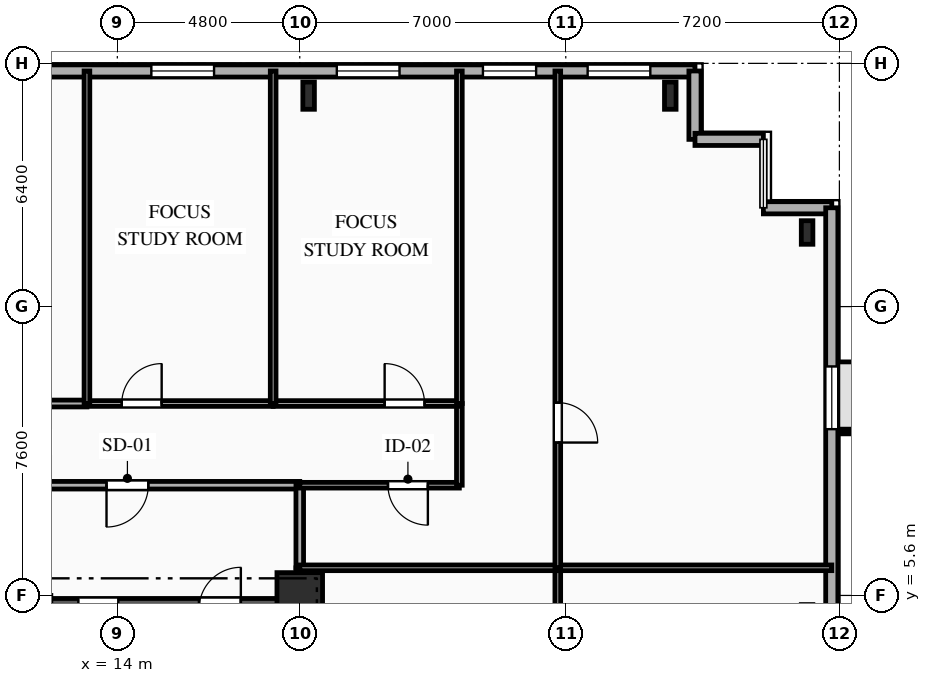
"""IFC4 building model, lengths in metres.
Left out: names, types, materials, properties, quantities, classifications, styles, units other than length and angle.
Written with IfcOpenShell. Run it as: python <this file> out.ifc"""

import sys

from ifc_helpers import new_model, si_unit, direction, frame, frame_2d, origin, origin_2d, place, context, subcontext, project, spatial, rectangle, i_section, extrude, element, fill, save


model = new_model("IFC4")
c1 = context("Model", 3, precision=1e-05, world=origin(), true_north=direction((0.0, 1.0)))
c2 = subcontext(c1, "Body", "Model", "MODEL_VIEW")
j1 = project(units=[si_unit("LENGTHUNIT", "METRE"), si_unit("PLANEANGLEUNIT", "RADIAN")], contexts=[c1])
p1 = place(None, origin())
s1 = spatial("IfcSite", under=j1, at=p1, CompositionType="ELEMENT")
p2 = place(p1, origin())
s2 = spatial("IfcBuilding", under=s1, at=p2, CompositionType="ELEMENT")
p3 = place(p2, frame((0.0, 0.0, 37.05)))
s3 = spatial("IfcBuildingStorey", under=s2, at=p3, CompositionType="ELEMENT", Elevation=37.05)
p4 = place(p3, frame((18.8, 5.6, 0.0), z_axis=(0.0, 0.0, 1.0), x_axis=(1.0, 0.0, 0.0)))
e1 = element("IfcColumn", 1, at=p4, inside=s3, PredefinedType="COLUMN", context=c2, shape_type="SweptSolid", body=[
    extrude(rectangle(XDim=1.2, YDim=1.2, at=origin_2d()), origin(), (0.0, 0.0, 1.0), 3.35),
])
for number, where, z_axis, x_axis in (
    (2, (28.55, 18.75, 0.0), (0.0, 0.0, 1.0), (1.0, 0.0, 0.0)),
    (3, (19.033, 18.75, 0.0), (0.0, 0.0, 1.0), (1.0, 0.0, 0.0)),
):
    element("IfcColumn", number, at=place(p3, frame(where, z_axis=z_axis, x_axis=x_axis)), inside=s3, PredefinedType="COLUMN", context=c2, shape_type="SweptSolid", body=[
        extrude(i_section(OverallWidth=0.304, OverallDepth=0.716, WebThickness=0.021, FlangeThickness=0.04, FilletRadius=0.027, at=origin_2d()), origin(), (0.0, 0.0, 1.0), 3.35),
    ])
p5 = place(p3, frame((32.15, 15.15, 0.0), z_axis=(0.0, 0.0, 1.0), x_axis=(1.0, 0.0, 0.0)))
e4 = element("IfcColumn", 4, at=p5, inside=s3, PredefinedType="COLUMN", context=c2, shape_type="SweptSolid", body=[
    extrude(i_section(OverallWidth=0.305, OverallDepth=0.62, WebThickness=0.021, FlangeThickness=0.04, FilletRadius=0.027, at=origin_2d()), origin(), (0.0, 0.0, 1.0), 3.35),
])
p6 = place(p3, frame((-29.2, 19.4, 0.0), z_axis=(0.0, 0.0, 1.0), x_axis=(1.0, 0.0, 0.0)))
e5 = element("IfcWall", 5, at=p6, inside=s3, PredefinedType="SOLIDWALL", context=c2, shape_type="SweptSolid", body=[
    extrude(rectangle(XDim=58.4, YDim=0.32, at=frame_2d((29.2, 0.0))), origin(), (0.0, 0.0, 1.0), 3.035),
])
p7 = place(p6, frame((10.596, 0.0, 0.85)))
e6 = element("IfcOpeningElement", 6, at=p7, cuts=e5, PredefinedType="OPENING", context=c2, shape_type="SweptSolid", body=[
    extrude(rectangle(XDim=1.65, YDim=1.85, at=frame_2d((0.825, 0.925))), frame((0.0, 0.17, 0.0), z_axis=(0.0, -1.0, 0.0), x_axis=(1.0, 0.0, 0.0)), (0.0, 0.0, 1.0), 0.34),
])
p8 = place(p6, frame((20.445, 0.0, 0.85)))
e7 = element("IfcOpeningElement", 7, at=p8, cuts=e5, PredefinedType="OPENING", context=c2, shape_type="SweptSolid", body=[
    extrude(rectangle(XDim=1.6, YDim=1.85, at=frame_2d((0.8, 0.925))), frame((0.0, 0.17, 0.0), z_axis=(0.0, -1.0, 0.0), x_axis=(1.0, 0.0, 0.0)), (0.0, 0.0, 1.0), 0.34),
])
p9 = place(p6, frame((26.516, 0.0, 0.85)))
e8 = element("IfcOpeningElement", 8, at=p9, cuts=e5, PredefinedType="OPENING", context=c2, shape_type="SweptSolid", body=[
    extrude(rectangle(XDim=2.2, YDim=1.85, at=frame_2d((1.1, 0.925))), frame((0.0, 0.17, 0.0), z_axis=(0.0, -1.0, 0.0), x_axis=(1.0, 0.0, 0.0)), (0.0, 0.0, 1.0), 0.34),
])
p10 = place(p6, frame((35.716, 0.0, 0.85)))
e9 = element("IfcOpeningElement", 9, at=p10, cuts=e5, PredefinedType="OPENING", context=c2, shape_type="SweptSolid", body=[
    extrude(rectangle(XDim=2.2, YDim=1.85, at=frame_2d((1.1, 0.925))), frame((0.0, 0.17, 0.0), z_axis=(0.0, -1.0, 0.0), x_axis=(1.0, 0.0, 0.0)), (0.0, 0.0, 1.0), 0.34),
])
p11 = place(p6, frame((44.095, 0.0, 0.85)))
e10 = element("IfcOpeningElement", 10, at=p11, cuts=e5, PredefinedType="OPENING", context=c2, shape_type="SweptSolid", body=[
    extrude(rectangle(XDim=1.65, YDim=1.85, at=frame_2d((0.825, 0.925))), frame((0.0, 0.17, 0.0), z_axis=(0.0, -1.0, 0.0), x_axis=(1.0, 0.0, 0.0)), (0.0, 0.0, 1.0), 0.34),
])
p12 = place(p6, frame((48.975, 0.0, 0.85)))
e11 = element("IfcOpeningElement", 11, at=p12, cuts=e5, PredefinedType="OPENING", context=c2, shape_type="SweptSolid", body=[
    extrude(rectangle(XDim=1.65, YDim=1.85, at=frame_2d((0.825, 0.925))), frame((0.0, 0.17, 0.0), z_axis=(0.0, -1.0, 0.0), x_axis=(1.0, 0.0, 0.0)), (0.0, 0.0, 1.0), 0.34),
])
p13 = place(p6, frame((52.82, 0.0, 0.85)))
e12 = element("IfcOpeningElement", 12, at=p13, cuts=e5, PredefinedType="OPENING", context=c2, shape_type="SweptSolid", body=[
    extrude(rectangle(XDim=1.4, YDim=1.85, at=frame_2d((0.7, 0.925))), frame((0.0, 0.17, 0.0), z_axis=(0.0, -1.0, 0.0), x_axis=(1.0, 0.0, 0.0)), (0.0, 0.0, 1.0), 0.34),
])
p14 = place(p6, frame((55.575, 0.0, 0.85)))
e13 = element("IfcOpeningElement", 13, at=p14, cuts=e5, PredefinedType="OPENING", context=c2, shape_type="SweptSolid", body=[
    extrude(rectangle(XDim=1.65, YDim=1.85, at=frame_2d((0.825, 0.925))), frame((0.0, 0.17, 0.0), z_axis=(0.0, -1.0, 0.0), x_axis=(1.0, 0.0, 0.0)), (0.0, 0.0, 1.0), 0.34),
])
p15 = place(p3, frame((29.2, 19.4, 0.0), z_axis=(0.0, 0.0, 1.0), x_axis=(0.0, -1.0, 0.0)))
e14 = element("IfcWall", 14, at=p15, inside=s3, PredefinedType="SOLIDWALL", context=c2, shape_type="SweptSolid", body=[
    extrude(rectangle(XDim=1.8, YDim=0.32, at=frame_2d((0.9, 0.0))), origin(), (0.0, 0.0, 1.0), 3.035),
])
for number, where, z_axis, x_axis in (
    (15, (29.2, 17.6, 0.0), (0.0, 0.0, 1.0), (1.0, 0.0, 0.0)),
    (16, (31.0, 15.8, 0.0), (0.0, 0.0, 1.0), (1.0, 0.0, 0.0)),
):
    element("IfcWall", number, at=place(p3, frame(where, z_axis=z_axis, x_axis=x_axis)), inside=s3, PredefinedType="SOLIDWALL", context=c2, shape_type="SweptSolid", body=[
        extrude(rectangle(XDim=1.8, YDim=0.32, at=frame_2d((0.9, 0.0))), origin(), (0.0, 0.0, 1.0), 3.035),
    ])
p16 = place(p3, frame((32.8, 15.8, 0.0), z_axis=(0.0, 0.0, 1.0), x_axis=(0.0, -1.0, 0.0)))
e17 = element("IfcWall", 17, at=p16, inside=s3, PredefinedType="SOLIDWALL", context=c2, shape_type="SweptSolid", body=[
    extrude(rectangle(XDim=31.6, YDim=0.32, at=frame_2d((15.8, 0.0))), origin(), (0.0, 0.0, 1.0), 3.035),
])
p17 = place(p16, frame((4.175, 0.0, 0.85)))
e18 = element("IfcOpeningElement", 18, at=p17, cuts=e17, PredefinedType="OPENING", context=c2, shape_type="SweptSolid", body=[
    extrude(rectangle(XDim=1.65, YDim=1.85, at=frame_2d((0.825, 0.925))), frame((0.0, 0.17, 0.0), z_axis=(0.0, -1.0, 0.0), x_axis=(1.0, 0.0, 0.0)), (0.0, 0.0, 1.0), 0.34),
])
p18 = place(p16, frame((15.015, 0.0, 0.85)))
e19 = element("IfcOpeningElement", 19, at=p18, cuts=e17, PredefinedType="OPENING", context=c2, shape_type="SweptSolid", body=[
    extrude(rectangle(XDim=1.65, YDim=1.85, at=frame_2d((0.825, 0.925))), frame((0.0, 0.17, 0.0), z_axis=(0.0, -1.0, 0.0), x_axis=(1.0, 0.0, 0.0)), (0.0, 0.0, 1.0), 0.34),
])
p19 = place(p16, frame((25.855, 0.0, 0.85)))
e20 = element("IfcOpeningElement", 20, at=p19, cuts=e17, PredefinedType="OPENING", context=c2, shape_type="SweptSolid", body=[
    extrude(rectangle(XDim=1.65, YDim=1.85, at=frame_2d((0.825, 0.925))), frame((0.0, 0.17, 0.0), z_axis=(0.0, -1.0, 0.0), x_axis=(1.0, 0.0, 0.0)), (0.0, 0.0, 1.0), 0.34),
])
p20 = place(p3, frame((9.2, 5.24, 0.0), z_axis=(0.0, 0.0, 1.0), x_axis=(1.0, 0.0, 0.0)))
e21 = element("IfcWall", 21, at=p20, inside=s3, PredefinedType="SHEAR", context=c2, shape_type="SweptSolid", body=[
    extrude(rectangle(XDim=9.6, YDim=0.56, at=frame_2d((4.8, 0.0))), origin(), (0.0, 0.0, 1.0), 3.035),
])
p21 = place(p20, frame((6.95, 0.0, 0.0)))
e22 = element("IfcOpeningElement", 22, at=p21, cuts=e21, PredefinedType="OPENING", context=c2, shape_type="SweptSolid", body=[
    extrude(rectangle(XDim=1.1, YDim=2.15, at=frame_2d((0.55, 1.075))), frame((0.0, 0.29, 0.0), z_axis=(0.0, -1.0, 0.0), x_axis=(1.0, 0.0, 0.0)), (0.0, 0.0, 1.0), 0.58),
])
p22 = place(p20, frame((3.775, 0.0, 0.0)))
e23 = element("IfcOpeningElement", 23, at=p22, cuts=e21, PredefinedType="OPENING", context=c2, shape_type="SweptSolid", body=[
    extrude(rectangle(XDim=1.05, YDim=2.1, at=frame_2d((0.525, 1.05))), frame((0.0, 0.29, 0.0), z_axis=(0.0, -1.0, 0.0), x_axis=(1.0, 0.0, 0.0)), (0.0, 0.0, 1.0), 0.58),
])
p23 = place(p3, frame((18.8, 8.5, 0.0), z_axis=(0.0, 0.0, 1.0), x_axis=(-1.0, 0.0, 0.0)))
e24 = element("IfcWall", 24, at=p23, inside=s3, PredefinedType="PARTITIONING", context=c2, shape_type="SweptSolid", body=[
    extrude(rectangle(XDim=6.8, YDim=0.2, at=frame_2d((3.4, 0.0))), origin(), (0.0, 0.0, 1.0), 3.035),
])
p24 = place(p23, frame((3.985, 0.0, 0.0)))
e25 = element("IfcOpeningElement", 25, at=p24, cuts=e24, PredefinedType="OPENING", context=c2, shape_type="SweptSolid", body=[
    extrude(rectangle(XDim=1.1, YDim=2.15, at=frame_2d((0.55, 1.075))), frame((0.0, 0.11, 0.0), z_axis=(0.0, -1.0, 0.0), x_axis=(1.0, 0.0, 0.0)), (0.0, 0.0, 1.0), 0.22),
])
p25 = place(p3, frame((18.8, 5.6, 0.0), z_axis=(0.0, 0.0, 1.0), x_axis=(0.0, 1.0, 0.0)))
e26 = element("IfcWall", 26, at=p25, inside=s3, PredefinedType="PARTITIONING", context=c2, shape_type="SweptSolid", body=[
    extrude(rectangle(XDim=0.727, YDim=0.2, at=frame_2d((0.363, 0.0))), origin(), (0.0, 0.0, 1.0), 2.52),
])
p26 = place(p3, frame((18.8, 6.327, 0.0), z_axis=(0.0, 0.0, 1.0), x_axis=(0.0, 1.0, 0.0)))
e27 = element("IfcWall", 27, at=p26, inside=s3, PredefinedType="PARTITIONING", context=c2, shape_type="SweptSolid", body=[
    extrude(rectangle(XDim=2.173, YDim=0.2, at=frame_2d((1.086, 0.0))), origin(), (0.0, 0.0, 1.0), 2.52),
])
p27 = place(p3, frame((23.0, 8.5, 0.0), z_axis=(0.0, 0.0, 1.0), x_axis=(-1.0, 0.0, 0.0)))
e28 = element("IfcWall", 28, at=p27, inside=s3, PredefinedType="PARTITIONING", context=c2, shape_type="SweptSolid", body=[
    extrude(rectangle(XDim=4.2, YDim=0.15, at=frame_2d((2.1, 0.0))), origin(), (0.0, 0.0, 1.0), 3.035),
])
p28 = place(p27, frame((0.829, 0.0, 0.0)))
e29 = element("IfcOpeningElement", 29, at=p28, cuts=e28, PredefinedType="OPENING", context=c2, shape_type="SweptSolid", body=[
    extrude(rectangle(XDim=1.05, YDim=2.15, at=frame_2d((0.525, 1.075))), frame((0.0, 0.085, 0.0), z_axis=(0.0, -1.0, 0.0), x_axis=(1.0, 0.0, 0.0)), (0.0, 0.0, 1.0), 0.17),
])
p29 = place(p3, frame((23.0, 10.65, 0.0), z_axis=(0.0, 0.0, 1.0), x_axis=(0.0, -1.0, 0.0)))
e30 = element("IfcWall", 30, at=p29, inside=s3, PredefinedType="PARTITIONING", context=c2, shape_type="SweptSolid", body=[
    extrude(rectangle(XDim=2.15, YDim=0.15, at=frame_2d((1.075, 0.0))), origin(), (0.0, 0.0, 1.0), 3.035),
])
p30 = place(p3, frame((6.45, 10.65, 0.0), z_axis=(0.0, 0.0, 1.0), x_axis=(1.0, 0.0, 0.0)))
e31 = element("IfcWall", 31, at=p30, inside=s3, PredefinedType="PARTITIONING", context=c2, shape_type="SweptSolid", body=[
    extrude(rectangle(XDim=6.75, YDim=0.18, at=frame_2d((3.375, 0.0))), origin(), (0.0, 0.0, 1.0), 3.035),
])
p31 = place(p30, frame((4.596, 0.0, 0.0)))
e32 = element("IfcOpeningElement", 32, at=p31, cuts=e31, PredefinedType="OPENING", context=c2, shape_type="SweptSolid", body=[
    extrude(rectangle(XDim=1.0, YDim=2.15, at=frame_2d((0.5, 1.075))), frame((0.0, 0.1, 0.0), z_axis=(0.0, -1.0, 0.0), x_axis=(1.0, 0.0, 0.0)), (0.0, 0.0, 1.0), 0.2),
])
p32 = place(p3, frame((13.2, 10.65, 0.0), z_axis=(0.0, 0.0, 1.0), x_axis=(1.0, 0.0, 0.0)))
e33 = element("IfcWall", 33, at=p32, inside=s3, PredefinedType="PARTITIONING", context=c2, shape_type="SweptSolid", body=[
    extrude(rectangle(XDim=4.9, YDim=0.15, at=frame_2d((2.45, 0.0))), origin(), (0.0, 0.0, 1.0), 3.035),
])
p33 = place(p32, frame((0.916, 0.0, 0.0)))
e34 = element("IfcOpeningElement", 34, at=p33, cuts=e33, PredefinedType="OPENING", context=c2, shape_type="SweptSolid", body=[
    extrude(rectangle(XDim=1.05, YDim=2.15, at=frame_2d((0.525, 1.075))), frame((0.0, 0.085, 0.0), z_axis=(0.0, -1.0, 0.0), x_axis=(1.0, 0.0, 0.0)), (0.0, 0.0, 1.0), 0.17),
])
p34 = place(p3, frame((18.1, 10.65, 0.0), z_axis=(0.0, 0.0, 1.0), x_axis=(1.0, 0.0, 0.0)))
e35 = element("IfcWall", 35, at=p34, inside=s3, PredefinedType="PARTITIONING", context=c2, shape_type="SweptSolid", body=[
    extrude(rectangle(XDim=4.9, YDim=0.15, at=frame_2d((2.45, 0.0))), origin(), (0.0, 0.0, 1.0), 3.035),
])
p35 = place(p34, frame((2.934, 0.0, 0.0)))
e36 = element("IfcOpeningElement", 36, at=p35, cuts=e35, PredefinedType="OPENING", context=c2, shape_type="SweptSolid", body=[
    extrude(rectangle(XDim=1.05, YDim=2.15, at=frame_2d((0.525, 1.075))), frame((0.0, 0.085, 0.0), z_axis=(0.0, -1.0, 0.0), x_axis=(1.0, 0.0, 0.0)), (0.0, 0.0, 1.0), 0.17),
])
p36 = place(p3, frame((25.59, 6.327, 0.0), z_axis=(0.0, 0.0, 1.0), x_axis=(0.0, -1.0, 0.0)))
e37 = element("IfcWall", 37, at=p36, inside=s3, PredefinedType="PARTITIONING", context=c2, shape_type="SweptSolid", body=[
    extrude(rectangle(XDim=12.654, YDim=0.15, at=frame_2d((6.327, 0.0))), origin(), (0.0, 0.0, 1.0), 2.69),
])
p37 = place(p36, frame((5.802, 0.0, 0.0)))
e38 = element("IfcOpeningElement", 38, at=p37, cuts=e37, PredefinedType="OPENING", context=c2, shape_type="SweptSolid", body=[
    extrude(rectangle(XDim=1.05, YDim=2.15, at=frame_2d((0.525, 1.075))), frame((0.0, 0.085, 0.0), z_axis=(0.0, -1.0, 0.0), x_axis=(1.0, 0.0, 0.0)), (0.0, 0.0, 1.0), 0.17),
])
p38 = place(p3, frame((18.8, 6.327, 0.0), z_axis=(0.0, 0.0, 1.0), x_axis=(1.0, 0.0, 0.0)))
e39 = element("IfcWall", 39, at=p38, inside=s3, PredefinedType="PARTITIONING", context=c2, shape_type="SweptSolid", body=[
    extrude(rectangle(XDim=6.79, YDim=0.15, at=frame_2d((3.395, 0.0))), origin(), (0.0, 0.0, 1.0), 3.035),
])
p39 = place(p3, frame((25.59, 6.327, 0.0), z_axis=(0.0, 0.0, 1.0), x_axis=(1.0, 0.0, 0.0)))
e40 = element("IfcWall", 40, at=p39, inside=s3, PredefinedType="PARTITIONING", context=c2, shape_type="SweptSolid", body=[
    extrude(rectangle(XDim=7.21, YDim=0.15, at=frame_2d((3.605, 0.0))), origin(), (0.0, 0.0, 1.0), 3.035),
])
p40 = place(p3, frame((25.59, 19.4, 0.0), z_axis=(0.0, 0.0, 1.0), x_axis=(0.0, -1.0, 0.0)))
e41 = element("IfcWall", 41, at=p40, inside=s3, PredefinedType="PARTITIONING", context=c2, shape_type="SweptSolid", body=[
    extrude(rectangle(XDim=13.073, YDim=0.15, at=frame_2d((6.537, 0.0))), origin(), (0.0, 0.0, 1.0), 2.69),
])
p41 = place(p40, frame((8.727, 0.0, 0.0)))
e42 = element("IfcOpeningElement", 42, at=p41, cuts=e41, PredefinedType="OPENING", context=c2, shape_type="SweptSolid", body=[
    extrude(rectangle(XDim=1.05, YDim=2.15, at=frame_2d((0.525, 1.075))), frame((0.0, 0.085, 0.0), z_axis=(0.0, -1.0, 0.0), x_axis=(1.0, 0.0, 0.0)), (0.0, 0.0, 1.0), 0.17),
])
for number, where, z_axis, x_axis in (
    (43, (23.0, 10.65, 0.0), (0.0, 0.0, 1.0), (0.0, 1.0, 0.0)),
    (44, (13.2, 19.4, 0.0), (0.0, 0.0, 1.0), (0.0, -1.0, 0.0)),
    (45, (18.1, 19.4, 0.0), (0.0, 0.0, 1.0), (0.0, -1.0, 0.0)),
):
    element("IfcWall", number, at=place(p3, frame(where, z_axis=z_axis, x_axis=x_axis)), inside=s3, PredefinedType="PARTITIONING", context=c2, shape_type="SweptSolid", body=[
        extrude(rectangle(XDim=8.75, YDim=0.15, at=frame_2d((4.375, 0.0))), origin(), (0.0, 0.0, 1.0), 3.035),
    ])
p42 = place(p11, origin())
e46 = element("IfcWindow", 46, at=p42, inside=s3, PartitioningType="SINGLE_PANEL", PredefinedType="WINDOW", context=c2, shape_type="SweptSolid", body=[
    extrude(rectangle(XDim=1.65, YDim=1.85, at=frame_2d((0.825, 0.925))), frame((0.0, 0.03, 0.0), z_axis=(0.0, -1.0, 0.0), x_axis=(1.0, 0.0, 0.0)), (0.0, 0.0, 1.0), 0.06),
])
fill(e10, e46)
p43 = place(p12, origin())
e47 = element("IfcWindow", 47, at=p43, inside=s3, PartitioningType="SINGLE_PANEL", PredefinedType="WINDOW", context=c2, shape_type="SweptSolid", body=[
    extrude(rectangle(XDim=1.65, YDim=1.85, at=frame_2d((0.825, 0.925))), frame((0.0, 0.03, 0.0), z_axis=(0.0, -1.0, 0.0), x_axis=(1.0, 0.0, 0.0)), (0.0, 0.0, 1.0), 0.06),
])
fill(e11, e47)
p44 = place(p13, origin())
e48 = element("IfcWindow", 48, at=p44, inside=s3, PartitioningType="SINGLE_PANEL", PredefinedType="WINDOW", context=c2, shape_type="SweptSolid", body=[
    extrude(rectangle(XDim=1.4, YDim=1.85, at=frame_2d((0.7, 0.925))), frame((0.0, 0.03, 0.0), z_axis=(0.0, -1.0, 0.0), x_axis=(1.0, 0.0, 0.0)), (0.0, 0.0, 1.0), 0.06),
])
fill(e12, e48)
p45 = place(p14, origin())
e49 = element("IfcWindow", 49, at=p45, inside=s3, PartitioningType="SINGLE_PANEL", PredefinedType="WINDOW", context=c2, shape_type="SweptSolid", body=[
    extrude(rectangle(XDim=1.65, YDim=1.85, at=frame_2d((0.825, 0.925))), frame((0.0, 0.03, 0.0), z_axis=(0.0, -1.0, 0.0), x_axis=(1.0, 0.0, 0.0)), (0.0, 0.0, 1.0), 0.06),
])
fill(e13, e49)
p46 = place(p17, origin())
e50 = element("IfcWindow", 50, at=p46, inside=s3, PartitioningType="SINGLE_PANEL", PredefinedType="WINDOW", context=c2, shape_type="SweptSolid", body=[
    extrude(rectangle(XDim=1.65, YDim=1.85, at=frame_2d((0.825, 0.925))), frame((0.0, 0.03, 0.0), z_axis=(0.0, -1.0, 0.0), x_axis=(1.0, 0.0, 0.0)), (0.0, 0.0, 1.0), 0.06),
])
fill(e18, e50)
p47 = place(p24, origin())
e51 = element("IfcDoor", 51, at=p47, inside=s3, OperationType="SINGLE_SWING_RIGHT", PredefinedType="DOOR", context=c2, shape_type="SweptSolid", body=[
    extrude(rectangle(XDim=1.1, YDim=2.15, at=frame_2d((0.55, 1.075))), frame((0.0, 0.025, 0.0), z_axis=(0.0, -1.0, 0.0), x_axis=(1.0, 0.0, 0.0)), (0.0, 0.0, 1.0), 0.05),
])
fill(e25, e51)
p48 = place(p28, origin())
e52 = element("IfcDoor", 52, at=p48, inside=s3, OperationType="SINGLE_SWING_LEFT", PredefinedType="DOOR", context=c2, shape_type="SweptSolid", body=[
    extrude(rectangle(XDim=1.05, YDim=2.15, at=frame_2d((0.525, 1.075))), frame((0.0, 0.025, 0.0), z_axis=(0.0, -1.0, 0.0), x_axis=(1.0, 0.0, 0.0)), (0.0, 0.0, 1.0), 0.05),
])
fill(e29, e52)
p49 = place(p33, origin())
e53 = element("IfcDoor", 53, at=p49, inside=s3, OperationType="SINGLE_SWING_RIGHT", PredefinedType="DOOR", context=c2, shape_type="SweptSolid", body=[
    extrude(rectangle(XDim=1.05, YDim=2.15, at=frame_2d((0.525, 1.075))), frame((0.0, 0.025, 0.0), z_axis=(0.0, -1.0, 0.0), x_axis=(1.0, 0.0, 0.0)), (0.0, 0.0, 1.0), 0.05),
])
fill(e34, e53)
p50 = place(p35, origin())
e54 = element("IfcDoor", 54, at=p50, inside=s3, OperationType="SINGLE_SWING_LEFT", PredefinedType="DOOR", context=c2, shape_type="SweptSolid", body=[
    extrude(rectangle(XDim=1.05, YDim=2.15, at=frame_2d((0.525, 1.075))), frame((0.0, 0.025, 0.0), z_axis=(0.0, -1.0, 0.0), x_axis=(1.0, 0.0, 0.0)), (0.0, 0.0, 1.0), 0.05),
])
fill(e36, e54)
p51 = place(p41, origin())
e55 = element("IfcDoor", 55, at=p51, inside=s3, OperationType="SINGLE_SWING_RIGHT", PredefinedType="DOOR", context=c2, shape_type="SweptSolid", body=[
    extrude(rectangle(XDim=1.05, YDim=2.15, at=frame_2d((0.525, 1.075))), frame((0.0, 0.025, 0.0), z_axis=(0.0, -1.0, 0.0), x_axis=(1.0, 0.0, 0.0)), (0.0, 0.0, 1.0), 0.05),
])
fill(e42, e55)
save(model, sys.argv[1])
